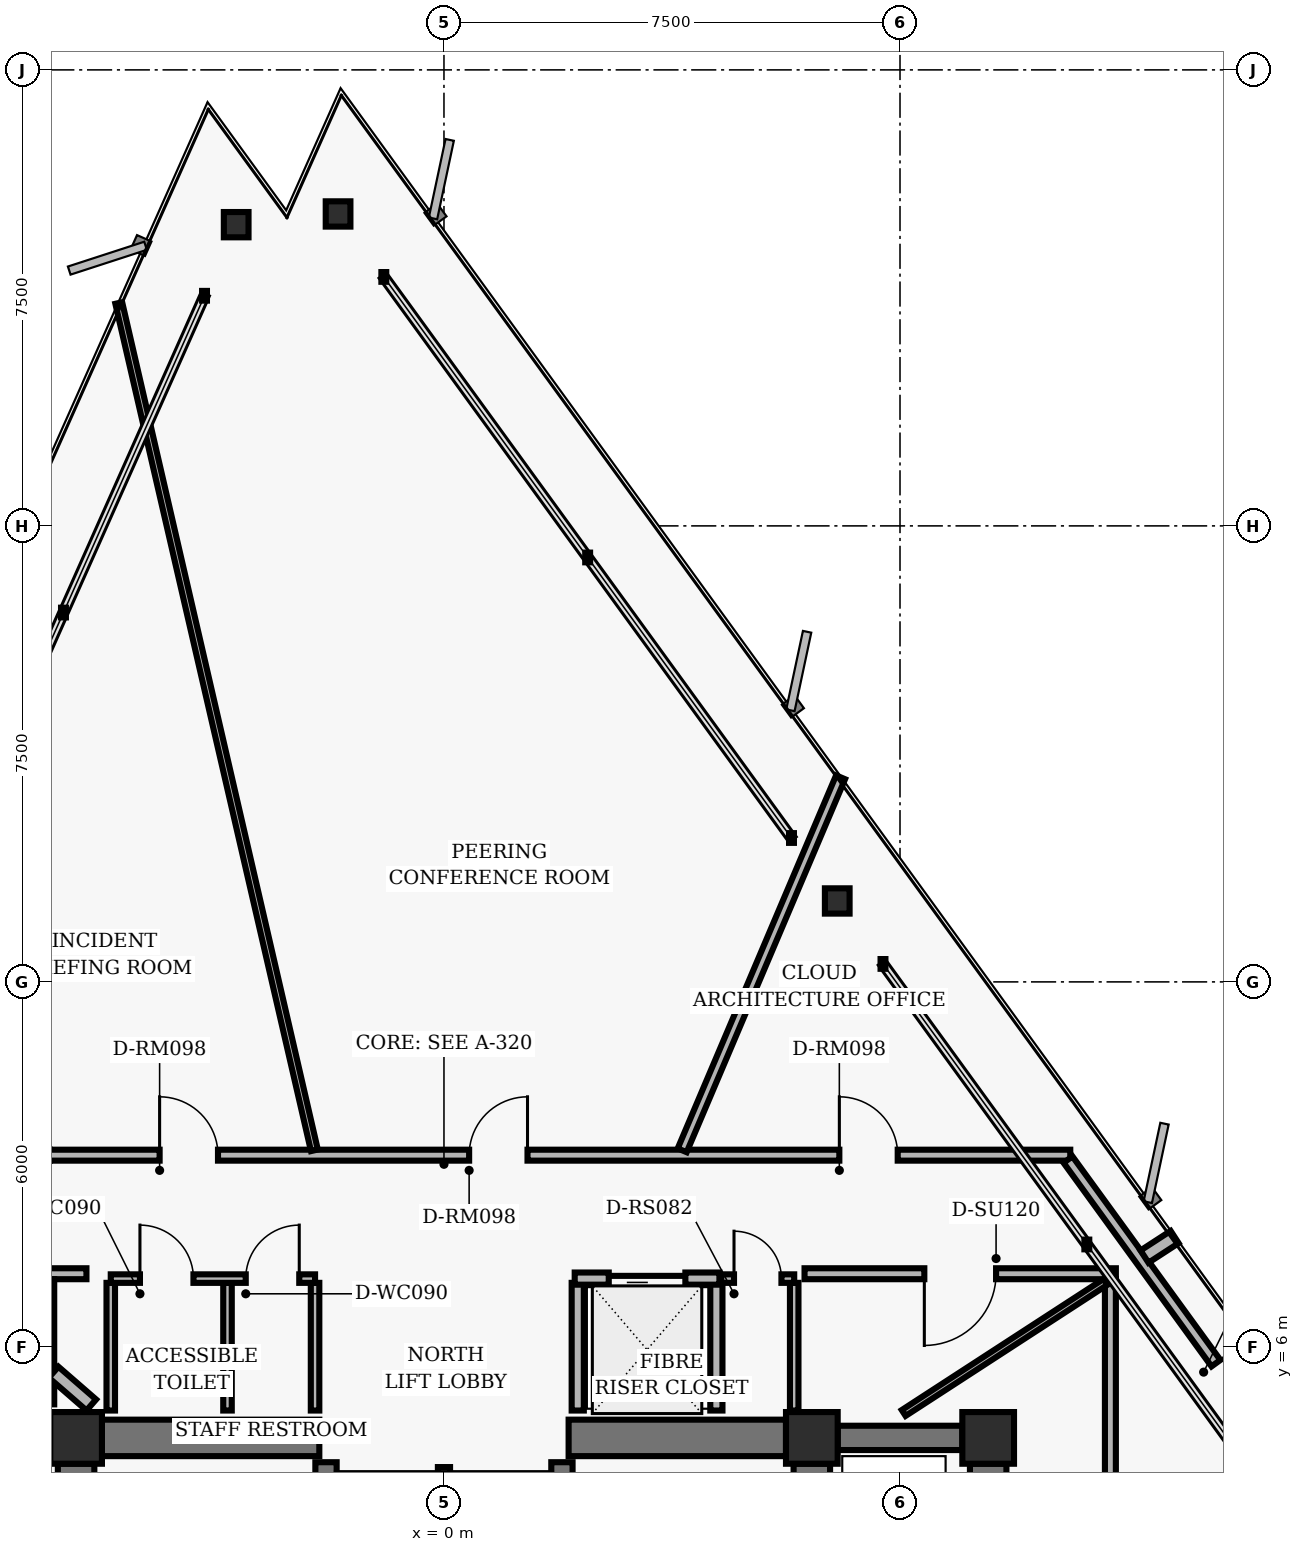
"""IFC4 building model, lengths in metres.
Left out: names, types, materials, properties, quantities, classifications, styles, units other than length and angle.
Written with IfcOpenShell. Run it as: python <this file> out.ifc"""

import sys

from ifc_helpers import new_model, si_unit, direction, frame, frame_2d, origin, origin_2d, place, context, subcontext, project, spatial, rectangle, hollow_rectangle, i_section, extrude, element, fill, save


model = new_model("IFC4")
c1 = context("Model", 3, precision=1e-05, world=origin(), true_north=direction((0.0, 1.0)))
c2 = subcontext(c1, "Body", "Model", "MODEL_VIEW")
j1 = project(units=[si_unit("LENGTHUNIT", "METRE"), si_unit("PLANEANGLEUNIT", "RADIAN")], contexts=[c1])
p1 = place(None, origin())
s1 = spatial("IfcSite", under=j1, at=p1, CompositionType="ELEMENT")
p2 = place(p1, origin())
s2 = spatial("IfcBuilding", under=s1, at=p2, CompositionType="ELEMENT")
p3 = place(p2, frame((0.0, 0.0, 116.8)))
s3 = spatial("IfcBuildingStorey", under=s2, at=p3, CompositionType="ELEMENT", Elevation=116.8)
for number, where, z_axis, x_axis in (
    (1, (-6.05, 4.5, 0.0), (0.0, 0.0, 1.0), (1.0, 0.0, 0.0)),
    (2, (6.05, 4.5, 0.0), (0.0, 0.0, 1.0), (1.0, 0.0, 0.0)),
    (3, (8.95, 4.5, 0.0), (0.0, 0.0, 1.0), (1.0, 0.0, 0.0)),
):
    element("IfcColumn", number, at=place(p3, frame(where, z_axis=z_axis, x_axis=x_axis)), inside=s3, PredefinedType="COLUMN", context=c2, shape_type="SweptSolid", body=[
        extrude(hollow_rectangle(XDim=0.85, YDim=0.85, WallThickness=0.055, InnerFilletRadius=0.02, OuterFilletRadius=0.04, at=origin_2d()), origin(), (0.0, 0.0, 1.0), 3.04),
    ])
for number, where, z_axis, x_axis in (
    (4, (-6.05, 0.425, 0.0), (0.0, 0.0, 1.0), (0.0, 1.0, 0.0)),
    (5, (6.05, 0.425, 0.0), (0.0, 0.0, 1.0), (0.0, 1.0, 0.0)),
):
    element("IfcWall", number, at=place(p3, frame(where, z_axis=z_axis, x_axis=x_axis)), inside=s3, PredefinedType="SHEAR", context=c2, shape_type="SweptSolid", body=[
        extrude(rectangle(XDim=3.65, YDim=0.6, at=frame_2d((1.825, 0.0))), origin(), (0.0, 0.0, 1.0), 2.788),
    ])
for number, where, z_axis, x_axis in (
    (6, (-1.94, -4.1, 0.0), (0.0, 0.0, 1.0), (0.0, 1.0, 0.0)),
    (7, (1.94, -4.1, 0.0), (0.0, 0.0, 1.0), (0.0, 1.0, 0.0)),
):
    element("IfcWall", number, at=place(p3, frame(where, z_axis=z_axis, x_axis=x_axis)), inside=s3, PredefinedType="SHEAR", context=c2, shape_type="SweptSolid", body=[
        extrude(rectangle(XDim=8.2, YDim=0.35, at=frame_2d((4.1, 0.0))), origin(), (0.0, 0.0, 1.0), 2.788),
    ])
for number, where, z_axis, x_axis in (
    (8, (-5.625, 4.5, 0.0), (0.0, 0.0, 1.0), (1.0, 0.0, 0.0)),
    (9, (2.05, 4.5, 0.0), (0.0, 0.0, 1.0), (1.0, 0.0, 0.0)),
):
    element("IfcWall", number, at=place(p3, frame(where, z_axis=z_axis, x_axis=x_axis)), inside=s3, PredefinedType="SHEAR", context=c2, shape_type="SweptSolid", body=[
        extrude(rectangle(XDim=3.575, YDim=0.6, at=frame_2d((1.788, 0.0))), origin(), (0.0, 0.0, 1.0), 2.788),
    ])
p4 = place(p3, frame((8.95, -3.875, 0.0), z_axis=(0.0, 0.0, 1.0), x_axis=(0.0, 1.0, 0.0)))
e10 = element("IfcWall", 10, at=p4, inside=s3, PredefinedType="SHEAR", context=c2, shape_type="SweptSolid", body=[
    extrude(rectangle(XDim=7.95, YDim=0.6, at=frame_2d((3.975, 0.0))), origin(), (0.0, 0.0, 1.0), 2.788),
])
p5 = place(p4, frame((0.55, 0.0, 0.0)))
e11 = element("IfcOpeningElement", 11, at=p5, cuts=e10, PredefinedType="OPENING", context=c2, shape_type="SweptSolid", body=[
    extrude(rectangle(XDim=1.06, YDim=2.04, at=frame_2d((0.53, 1.02))), frame((0.0, 0.31, 0.0), z_axis=(0.0, -1.0, 0.0), x_axis=(1.0, 0.0, 0.0)), (0.0, 0.0, 1.0), 0.62),
])
p6 = place(p4, frame((3.445, 0.0, 0.0)))
e12 = element("IfcOpeningElement", 12, at=p6, cuts=e10, PredefinedType="OPENING", context=c2, shape_type="SweptSolid", body=[
    extrude(rectangle(XDim=1.06, YDim=2.04, at=frame_2d((0.53, 1.02))), frame((0.0, 0.31, 0.0), z_axis=(0.0, -1.0, 0.0), x_axis=(1.0, 0.0, 0.0)), (0.0, 0.0, 1.0), 0.62),
])
p7 = place(p4, frame((6.33, 0.0, 0.0)))
e13 = element("IfcOpeningElement", 13, at=p7, cuts=e10, PredefinedType="OPENING", context=c2, shape_type="SweptSolid", body=[
    extrude(rectangle(XDim=1.06, YDim=2.04, at=frame_2d((0.53, 1.02))), frame((0.0, 0.31, 0.0), z_axis=(0.0, -1.0, 0.0), x_axis=(1.0, 0.0, 0.0)), (0.0, 0.0, 1.0), 0.62),
])
p8 = place(p3, frame((6.475, 4.5, 0.0), z_axis=(0.0, 0.0, 1.0), x_axis=(1.0, 0.0, 0.0)))
e14 = element("IfcWall", 14, at=p8, inside=s3, PredefinedType="SHEAR", context=c2, shape_type="SweptSolid", body=[
    extrude(rectangle(XDim=2.05, YDim=0.4, at=frame_2d((1.025, 0.0))), origin(), (0.0, 0.0, 1.0), 2.788),
])
for number, where, z_axis, x_axis in (
    (15, (6.468, 13.331, 0.0), (0.0, 0.0, 1.0), (1.0, 0.0, 0.0)),
    (16, (-1.742, 24.63, 0.0), (0.0, 0.0, 1.0), (1.0, 0.0, 0.0)),
    (17, (-3.417, 24.454, 0.0), (0.0, 0.0, 1.0), (1.0, 0.0, 0.0)),
):
    element("IfcColumn", number, at=place(p3, frame(where, z_axis=z_axis, x_axis=x_axis)), inside=s3, PredefinedType="COLUMN", context=c2, shape_type="SweptSolid", body=[
        extrude(i_section(OverallWidth=0.406, OverallDepth=0.416, WebThickness=0.03, FlangeThickness=0.048, FilletRadius=0.02, at=origin_2d()), origin(), (0.0, 0.0, 1.0), 3.04),
    ])
p9 = place(p3, frame((0.0, 1.25, 0.0), z_axis=(0.0, 0.0, 1.0), x_axis=(0.0, 1.0, 0.0)))
e18 = element("IfcWall", 18, at=p9, inside=s3, PredefinedType="PARTITIONING", context=c2, shape_type="SweptSolid", body=[
    extrude(rectangle(XDim=2.77, YDim=0.2, at=frame_2d((1.385, 0.0))), origin(), (0.0, 0.0, 1.0), 2.763),
])
p10 = place(p3, frame((2.2, 4.95, 0.0), z_axis=(0.0, 0.0, 1.0), x_axis=(0.0, 1.0, 0.0)))
e19 = element("IfcWall", 19, at=p10, inside=s3, PredefinedType="PARTITIONING", context=c2, shape_type="SweptSolid", body=[
    extrude(rectangle(XDim=2.1, YDim=0.2, at=frame_2d((1.05, 0.0))), origin(), (0.0, 0.0, 1.0), 2.132),
])
p11 = place(p3, frame((4.48, 4.95, 0.0), z_axis=(0.0, 0.0, 1.0), x_axis=(0.0, 1.0, 0.0)))
e20 = element("IfcWall", 20, at=p11, inside=s3, PredefinedType="PARTITIONING", context=c2, shape_type="SweptSolid", body=[
    extrude(rectangle(XDim=2.1, YDim=0.2, at=frame_2d((1.05, 0.0))), origin(), (0.0, 0.0, 1.0), 2.763),
])
p12 = place(p3, frame((2.15, 7.12, 0.0), z_axis=(0.0, 0.0, 1.0), x_axis=(1.0, 0.0, 0.0)))
e21 = element("IfcWall", 21, at=p12, inside=s3, PredefinedType="PARTITIONING", context=c2, shape_type="SweptSolid", body=[
    extrude(rectangle(XDim=2.38, YDim=0.2, at=frame_2d((1.19, 0.0))), origin(), (0.0, 0.0, 1.0), 2.763),
])
p13 = place(p12, frame((0.56, 0.0, 0.0)))
e22 = element("IfcOpeningElement", 22, at=p13, cuts=e21, PredefinedType="OPENING", context=c2, shape_type="SweptSolid", body=[
    extrude(rectangle(XDim=1.26, YDim=2.06, at=frame_2d((0.63, 1.03))), frame((0.0, 0.11, 0.0), z_axis=(0.0, -1.0, 0.0), x_axis=(1.0, 0.0, 0.0)), (0.0, 0.0, 1.0), 0.22),
])
for number, where, z_axis, x_axis in (
    (23, (-5.48, 4.95, 0.0), (0.0, 0.0, 1.0), (0.0, 1.0, 0.0)),
    (24, (-3.56, 4.95, 0.0), (0.0, 0.0, 1.0), (0.0, 1.0, 0.0)),
    (25, (-2.12, 4.95, 0.0), (0.0, 0.0, 1.0), (0.0, 1.0, 0.0)),
):
    element("IfcWall", number, at=place(p3, frame(where, z_axis=z_axis, x_axis=x_axis)), inside=s3, PredefinedType="PARTITIONING", context=c2, shape_type="SweptSolid", body=[
        extrude(rectangle(XDim=2.1, YDim=0.14, at=frame_2d((1.05, 0.0))), origin(), (0.0, 0.0, 1.0), 2.763),
    ])
p14 = place(p3, frame((-5.48, 7.12, 0.0), z_axis=(0.0, 0.0, 1.0), x_axis=(1.0, 0.0, 0.0)))
e26 = element("IfcWall", 26, at=p14, inside=s3, PredefinedType="PARTITIONING", context=c2, shape_type="SweptSolid", body=[
    extrude(rectangle(XDim=3.36, YDim=0.14, at=frame_2d((1.68, 0.0))), origin(), (0.0, 0.0, 1.0), 2.763),
])
p15 = place(p14, frame((0.48, 0.0, 0.0)))
e27 = element("IfcOpeningElement", 27, at=p15, cuts=e26, PredefinedType="OPENING", context=c2, shape_type="SweptSolid", body=[
    extrude(rectangle(XDim=0.88, YDim=2.02, at=frame_2d((0.44, 1.01))), frame((0.0, 0.08, 0.0), z_axis=(0.0, -1.0, 0.0), x_axis=(1.0, 0.0, 0.0)), (0.0, 0.0, 1.0), 0.16),
])
p16 = place(p14, frame((2.22, 0.0, 0.0)))
e28 = element("IfcOpeningElement", 28, at=p16, cuts=e26, PredefinedType="OPENING", context=c2, shape_type="SweptSolid", body=[
    extrude(rectangle(XDim=0.88, YDim=2.02, at=frame_2d((0.44, 1.01))), frame((0.0, 0.08, 0.0), z_axis=(0.0, -1.0, 0.0), x_axis=(1.0, 0.0, 0.0)), (0.0, 0.0, 1.0), 0.16),
])
p17 = place(p3, frame((5.76, 4.95, 0.0), z_axis=(0.0, 0.0, 1.0), x_axis=(0.0, 1.0, 0.0)))
e29 = element("IfcWall", 29, at=p17, inside=s3, PredefinedType="PARTITIONING", context=c2, shape_type="SweptSolid", body=[
    extrude(rectangle(XDim=2.1, YDim=0.14, at=frame_2d((1.05, 0.0))), origin(), (0.0, 0.0, 1.0), 2.132),
])
p18 = place(p3, frame((4.56, 7.12, 0.0), z_axis=(0.0, 0.0, 1.0), x_axis=(1.0, 0.0, 0.0)))
e30 = element("IfcWall", 30, at=p18, inside=s3, PredefinedType="PARTITIONING", context=c2, shape_type="SweptSolid", body=[
    extrude(rectangle(XDim=1.2, YDim=0.14, at=frame_2d((0.6, 0.0))), origin(), (0.0, 0.0, 1.0), 2.763),
])
p19 = place(p18, frame((0.21, 0.0, 0.0)))
e31 = element("IfcOpeningElement", 31, at=p19, cuts=e30, PredefinedType="OPENING", context=c2, shape_type="SweptSolid", body=[
    extrude(rectangle(XDim=0.78, YDim=2.01, at=frame_2d((0.39, 1.005))), frame((0.0, 0.08, 0.0), z_axis=(0.0, -1.0, 0.0), x_axis=(1.0, 0.0, 0.0)), (0.0, 0.0, 1.0), 0.16),
])
p20 = place(p3, frame((-6.52, 9.15, 0.0), z_axis=(0.0, 0.0, 1.0), x_axis=(1.0, 0.0, 0.0)))
e32 = element("IfcWall", 32, at=p20, inside=s3, PredefinedType="PARTITIONING", context=c2, shape_type="SweptSolid", body=[
    extrude(rectangle(XDim=16.82, YDim=0.18, at=frame_2d((8.41, 0.0))), origin(), (0.0, 0.0, 1.0), 2.763),
])
p21 = place(p20, frame((13.022, 0.0, 0.0)))
e33 = element("IfcOpeningElement", 33, at=p21, cuts=e32, PredefinedType="OPENING", context=c2, shape_type="SweptSolid", body=[
    extrude(rectangle(XDim=0.96, YDim=2.02, at=frame_2d((0.48, 1.01))), frame((0.0, 0.1, 0.0), z_axis=(0.0, -1.0, 0.0), x_axis=(1.0, 0.0, 0.0)), (0.0, 0.0, 1.0), 0.2),
])
p22 = place(p20, frame((6.934, 0.0, 0.0)))
e34 = element("IfcOpeningElement", 34, at=p22, cuts=e32, PredefinedType="OPENING", context=c2, shape_type="SweptSolid", body=[
    extrude(rectangle(XDim=0.96, YDim=2.02, at=frame_2d((0.48, 1.01))), frame((0.0, 0.1, 0.0), z_axis=(0.0, -1.0, 0.0), x_axis=(1.0, 0.0, 0.0)), (0.0, 0.0, 1.0), 0.2),
])
p23 = place(p20, frame((1.844, 0.0, 0.0)))
e35 = element("IfcOpeningElement", 35, at=p23, cuts=e32, PredefinedType="OPENING", context=c2, shape_type="SweptSolid", body=[
    extrude(rectangle(XDim=0.96, YDim=2.02, at=frame_2d((0.48, 1.01))), frame((0.0, 0.1, 0.0), z_axis=(0.0, -1.0, 0.0), x_axis=(1.0, 0.0, 0.0)), (0.0, 0.0, 1.0), 0.2),
])
p24 = place(p3, frame((10.263, 9.077, 0.0), z_axis=(0.0, 0.0, 1.0), x_axis=(0.587780951295, -0.809020119215, 0.0)))
e36 = element("IfcWall", 36, at=p24, inside=s3, PredefinedType="PARTITIONING", context=c2, shape_type="SweptSolid", body=[
    extrude(rectangle(XDim=7.469, YDim=0.18, at=frame_2d((3.734, 0.0))), origin(), (0.0, 0.0, 1.0), 2.763),
])
p25 = place(p24, frame((4.139, 0.0, 0.0)))
e37 = element("IfcOpeningElement", 37, at=p25, cuts=e36, PredefinedType="OPENING", context=c2, shape_type="SweptSolid", body=[
    extrude(rectangle(XDim=0.96, YDim=2.02, at=frame_2d((0.48, 1.01))), frame((0.0, 0.1, 0.0), z_axis=(0.0, -1.0, 0.0), x_axis=(1.0, 0.0, 0.0)), (0.0, 0.0, 1.0), 0.2),
])
p26 = place(p3, frame((10.96, 3.84, 0.0), z_axis=(0.0, 0.0, 1.0), x_axis=(0.0, 1.0, 0.0)))
e38 = element("IfcWall", 38, at=p26, inside=s3, PredefinedType="PARTITIONING", context=c2, shape_type="SweptSolid", body=[
    extrude(rectangle(XDim=3.271, YDim=0.18, at=frame_2d((1.635, 0.0))), origin(), (0.0, 0.0, 1.0), 2.763),
])
p27 = place(p3, frame((11.05, 7.2, 0.0), z_axis=(0.0, 0.0, 1.0), x_axis=(-1.0, 0.0, 0.0)))
e39 = element("IfcWall", 39, at=p27, inside=s3, PredefinedType="PARTITIONING", context=c2, shape_type="SweptSolid", body=[
    extrude(rectangle(XDim=5.12, YDim=0.18, at=frame_2d((2.56, 0.0))), origin(), (0.0, 0.0, 1.0), 2.763),
])
p28 = place(p27, frame((1.97, 0.0, 0.0)))
e40 = element("IfcOpeningElement", 40, at=p28, cuts=e39, PredefinedType="OPENING", context=c2, shape_type="SweptSolid", body=[
    extrude(rectangle(XDim=1.18, YDim=2.02, at=frame_2d((0.59, 1.01))), frame((0.0, 0.1, 0.0), z_axis=(0.0, -1.0, 0.0), x_axis=(1.0, 0.0, 0.0)), (0.0, 0.0, 1.0), 0.2),
])
p29 = place(p3, frame((-5.88, 7.2, 0.0), z_axis=(0.0, 0.0, 1.0), x_axis=(-1.0, 0.0, 0.0)))
e41 = element("IfcWall", 41, at=p29, inside=s3, PredefinedType="PARTITIONING", context=c2, shape_type="SweptSolid", body=[
    extrude(rectangle(XDim=0.71, YDim=0.18, at=frame_2d((0.355, 0.0))), origin(), (0.0, 0.0, 1.0), 2.763),
])
p30 = place(p3, frame((-6.5, 7.11, 0.0), z_axis=(0.0, 0.0, 1.0), x_axis=(0.0, -1.0, 0.0)))
e42 = element("IfcWall", 42, at=p30, inside=s3, PredefinedType="PARTITIONING", context=c2, shape_type="SweptSolid", body=[
    extrude(rectangle(XDim=2.058, YDim=0.18, at=frame_2d((1.029, 0.0))), origin(), (0.0, 0.0, 1.0), 2.763),
])
p31 = place(p3, frame((7.561, 4.91, 0.0), z_axis=(0.0, 0.0, 1.0), x_axis=(0.838633829817, 0.544695602595, 0.0)))
e43 = element("IfcWall", 43, at=p31, inside=s3, PredefinedType="MOVABLE", context=c2, shape_type="SweptSolid", body=[
    extrude(rectangle(XDim=3.958, YDim=0.115, at=frame_2d((1.979, 0.0))), origin(), (0.0, 0.0, 1.0), 2.763),
])
p32 = place(p3, frame((11.521, 7.482, 0.0), z_axis=(0.0, 0.0, 1.0), x_axis=(0.838415292805, 0.545031922726, 0.0)))
e44 = element("IfcWall", 44, at=p32, inside=s3, PredefinedType="PARTITIONING", context=c2, shape_type="SweptSolid", body=[
    extrude(rectangle(XDim=0.591, YDim=0.24, at=frame_2d((0.295, 0.0))), origin(), (0.0, 0.0, 1.0), 2.763),
])
p33 = place(p3, frame((3.918, 9.23, 0.0), z_axis=(0.0, 0.0, 1.0), x_axis=(0.390716336296, 0.920511132226, 0.0)))
e45 = element("IfcWall", 45, at=p33, inside=s3, PredefinedType="PARTITIONING", context=c2, shape_type="SweptSolid", body=[
    extrude(rectangle(XDim=6.665, YDim=0.16, at=frame_2d((3.333, 0.0))), origin(), (0.0, 0.0, 1.0), 2.763),
])
p34 = place(p3, frame((-2.131, 9.23, 0.0), z_axis=(0.0, 0.0, 1.0), x_axis=(-0.224960484743, 0.974367887558, 0.0)))
e46 = element("IfcWall", 46, at=p34, inside=s3, PredefinedType="MOVABLE", context=c2, shape_type="SweptSolid", body=[
    extrude(rectangle(XDim=14.303, YDim=0.115, at=frame_2d((7.151, 0.0))), origin(), (0.0, 0.0, 1.0), 2.763),
])
p35 = place(p3, frame((-5.8, 5.042, 0.0), z_axis=(0.0, 0.0, 1.0), x_axis=(-0.754727098443, 0.65603887604, 0.0)))
e47 = element("IfcWall", 47, at=p35, inside=s3, PredefinedType="PARTITIONING", context=c2, shape_type="SweptSolid", body=[
    extrude(rectangle(XDim=0.821, YDim=0.24, at=frame_2d((0.411, 0.0))), origin(), (0.0, 0.0, 1.0), 2.763),
])
p36 = place(p13, origin())
e48 = element("IfcDoor", 48, at=p36, inside=s3, OperationType="SLIDING_TO_LEFT", PredefinedType="DOOR", context=c2, shape_type="SweptSolid", body=[
    extrude(rectangle(XDim=1.26, YDim=2.06, at=frame_2d((0.63, 1.03))), frame((0.0, 0.025, 0.0), z_axis=(0.0, -1.0, 0.0), x_axis=(1.0, 0.0, 0.0)), (0.0, 0.0, 1.0), 0.05),
])
fill(e22, e48)
p37 = place(p15, origin())
e49 = element("IfcDoor", 49, at=p37, inside=s3, OperationType="SINGLE_SWING_LEFT", PredefinedType="DOOR", context=c2, shape_type="SweptSolid", body=[
    extrude(rectangle(XDim=0.88, YDim=2.02, at=frame_2d((0.44, 1.01))), frame((0.0, 0.025, 0.0), z_axis=(0.0, -1.0, 0.0), x_axis=(1.0, 0.0, 0.0)), (0.0, 0.0, 1.0), 0.05),
])
fill(e27, e49)
p38 = place(p16, origin())
e50 = element("IfcDoor", 50, at=p38, inside=s3, OperationType="SINGLE_SWING_RIGHT", PredefinedType="DOOR", context=c2, shape_type="SweptSolid", body=[
    extrude(rectangle(XDim=0.88, YDim=2.02, at=frame_2d((0.44, 1.01))), frame((0.0, 0.025, 0.0), z_axis=(0.0, -1.0, 0.0), x_axis=(1.0, 0.0, 0.0)), (0.0, 0.0, 1.0), 0.05),
])
fill(e28, e50)
p39 = place(p19, origin())
e51 = element("IfcDoor", 51, at=p39, inside=s3, OperationType="SINGLE_SWING_LEFT", PredefinedType="DOOR", context=c2, shape_type="SweptSolid", body=[
    extrude(rectangle(XDim=0.78, YDim=2.01, at=frame_2d((0.39, 1.005))), frame((0.0, 0.025, 0.0), z_axis=(0.0, -1.0, 0.0), x_axis=(1.0, 0.0, 0.0)), (0.0, 0.0, 1.0), 0.05),
])
fill(e31, e51)
p40 = place(p25, origin())
e52 = element("IfcDoor", 52, at=p40, inside=s3, OperationType="SINGLE_SWING_LEFT", PredefinedType="DOOR", context=c2, shape_type="SweptSolid", body=[
    extrude(rectangle(XDim=0.96, YDim=2.02, at=frame_2d((0.48, 1.01))), frame((0.0, 0.025, 0.0), z_axis=(0.0, -1.0, 0.0), x_axis=(1.0, 0.0, 0.0)), (0.0, 0.0, 1.0), 0.05),
])
fill(e37, e52)
p41 = place(p28, origin())
e53 = element("IfcDoor", 53, at=p41, inside=s3, OperationType="SINGLE_SWING_RIGHT", PredefinedType="DOOR", context=c2, shape_type="SweptSolid", body=[
    extrude(rectangle(XDim=1.18, YDim=2.02, at=frame_2d((0.59, 1.01))), frame((0.0, 0.025, 0.0), z_axis=(0.0, -1.0, 0.0), x_axis=(1.0, 0.0, 0.0)), (0.0, 0.0, 1.0), 0.05),
])
fill(e40, e53)
p42 = place(p21, origin())
e54 = element("IfcDoor", 54, at=p42, inside=s3, OperationType="SINGLE_SWING_LEFT", PredefinedType="DOOR", context=c2, shape_type="SweptSolid", body=[
    extrude(rectangle(XDim=0.96, YDim=2.02, at=frame_2d((0.48, 1.01))), frame((0.0, 0.025, 0.0), z_axis=(0.0, -1.0, 0.0), x_axis=(1.0, 0.0, 0.0)), (0.0, 0.0, 1.0), 0.05),
])
fill(e33, e54)
p43 = place(p22, origin())
e55 = element("IfcDoor", 55, at=p43, inside=s3, OperationType="SINGLE_SWING_RIGHT", PredefinedType="DOOR", context=c2, shape_type="SweptSolid", body=[
    extrude(rectangle(XDim=0.96, YDim=2.02, at=frame_2d((0.48, 1.01))), frame((0.0, 0.025, 0.0), z_axis=(0.0, -1.0, 0.0), x_axis=(1.0, 0.0, 0.0)), (0.0, 0.0, 1.0), 0.05),
])
fill(e34, e55)
p44 = place(p23, origin())
e56 = element("IfcDoor", 56, at=p44, inside=s3, OperationType="SINGLE_SWING_LEFT", PredefinedType="DOOR", context=c2, shape_type="SweptSolid", body=[
    extrude(rectangle(XDim=0.96, YDim=2.02, at=frame_2d((0.48, 1.01))), frame((0.0, 0.025, 0.0), z_axis=(0.0, -1.0, 0.0), x_axis=(1.0, 0.0, 0.0)), (0.0, 0.0, 1.0), 0.05),
])
fill(e35, e56)
save(model, sys.argv[1])
